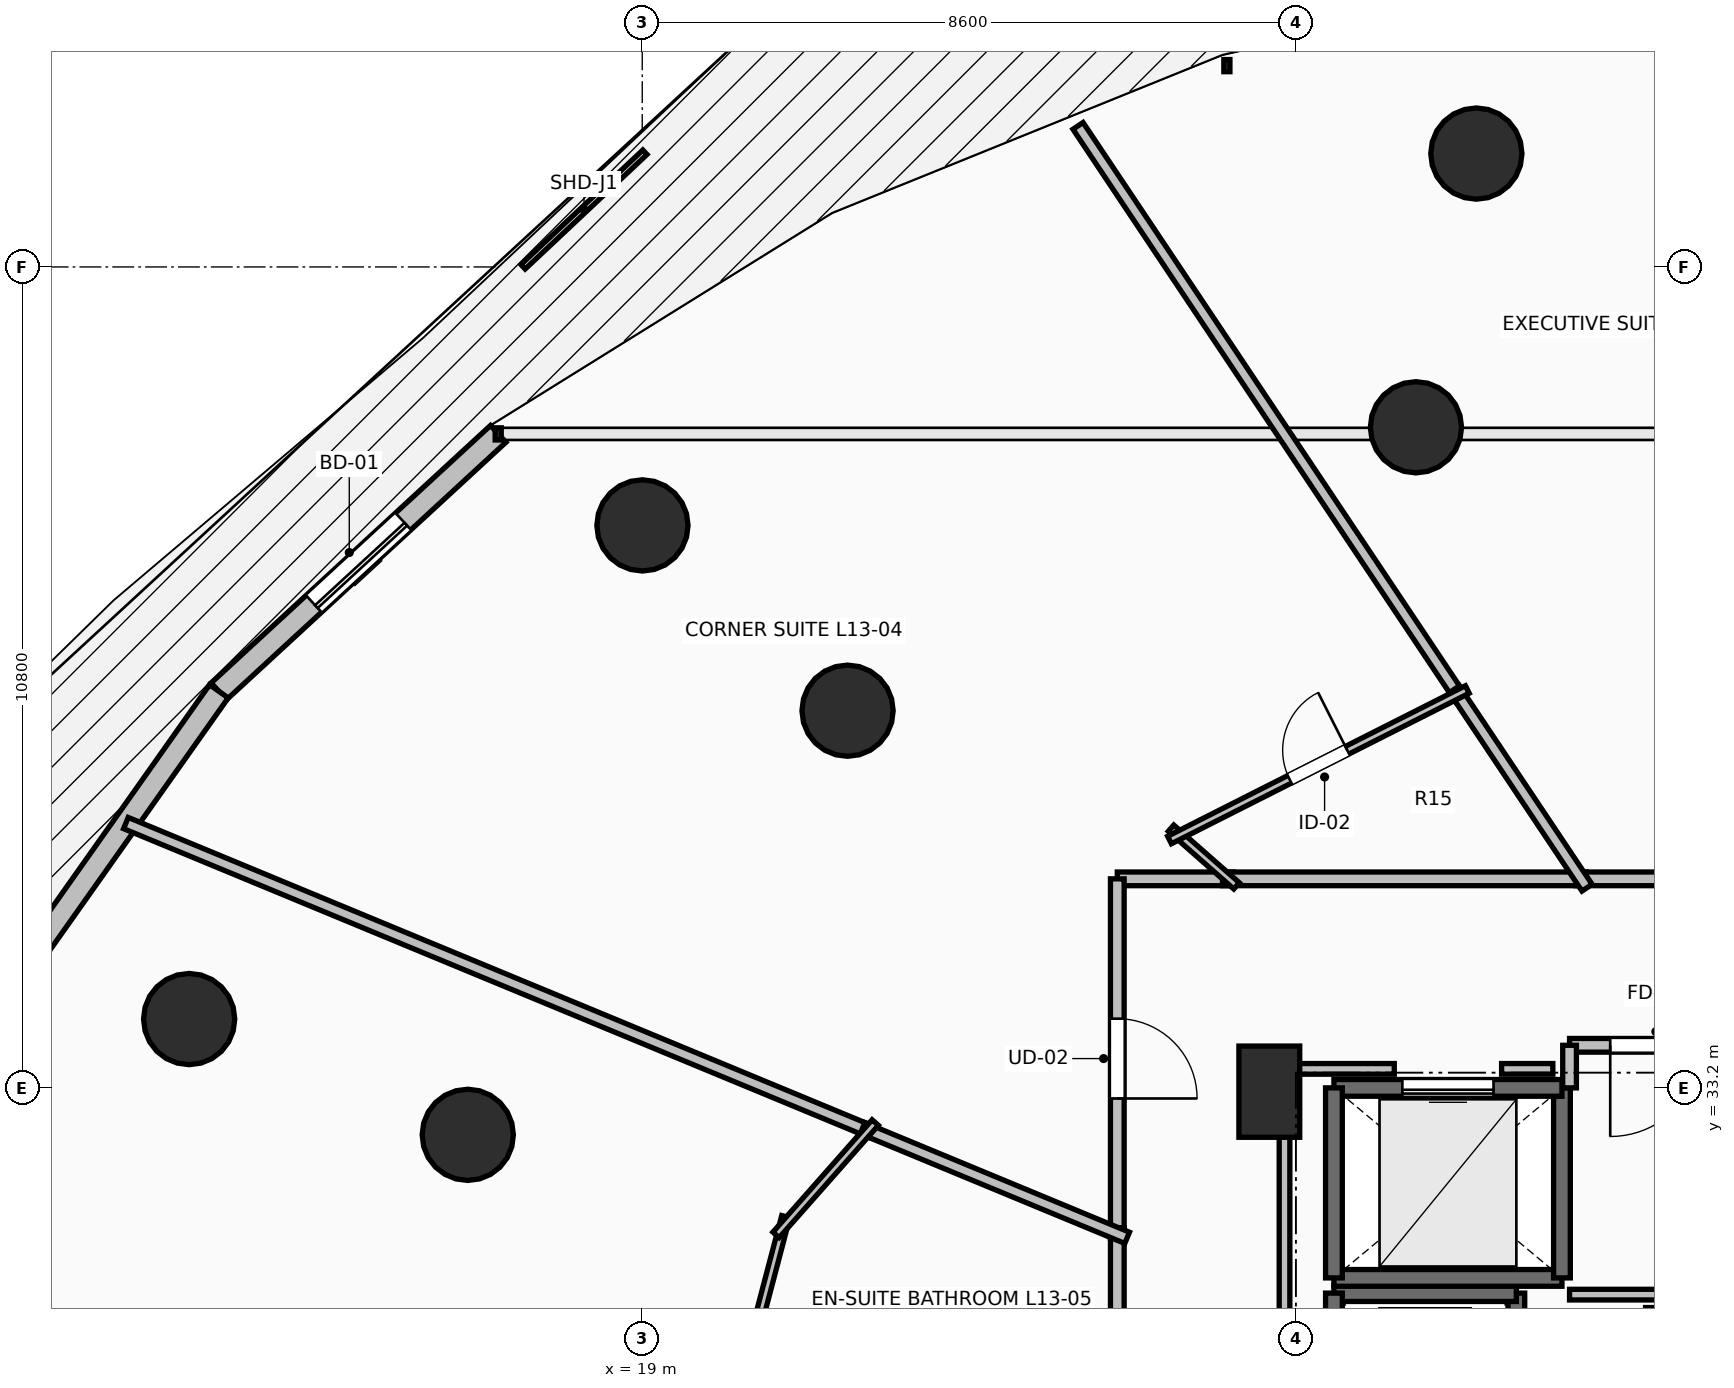
"""IFC4 building model, lengths in metres.
Left out: names, types, materials, properties, quantities, classifications, styles, units other than length and angle.
Written with IfcOpenShell. Run it as: python <this file> out.ifc"""

import sys

from ifc_helpers import new_model, si_unit, direction, frame, frame_2d, origin, origin_2d, place, context, subcontext, project, spatial, rectangle, circle, extrude, element, fill, save


model = new_model("IFC4")
c1 = context("Model", 3, precision=1e-05, world=origin(), true_north=direction((0.0, 1.0)))
c2 = subcontext(c1, "Body", "Model", "MODEL_VIEW")
j1 = project(units=[si_unit("LENGTHUNIT", "METRE"), si_unit("PLANEANGLEUNIT", "RADIAN")], contexts=[c1])
p1 = place(None, origin())
s1 = spatial("IfcSite", under=j1, at=p1, CompositionType="ELEMENT")
p2 = place(p1, origin())
s2 = spatial("IfcBuilding", under=s1, at=p2, CompositionType="ELEMENT")
p3 = place(p2, frame((0.0, 0.0, 52.0)))
s3 = spatial("IfcBuildingStorey", under=s2, at=p3, CompositionType="ELEMENT", Elevation=52.0)
for number, where, z_axis, x_axis in (
    (1, (29.179, 41.891, 0.0), (0.0, 0.0, 1.0), (-0.383, 0.924, 0.0)),
    (2, (21.701, 38.162, 0.0), (0.0, 0.0, 1.0), (-0.707, 0.707, 0.0)),
    (3, (16.705, 32.582, 0.0), (0.0, 0.0, 1.0), (-0.924, 0.383, 0.0)),
    (4, (29.974, 45.492, 0.0), (0.0, 0.0, 1.0), (-0.383, 0.924, 0.0)),
    (5, (19.003, 40.6, 0.0), (0.0, 0.0, 1.0), (-0.707, 0.707, 0.0)),
    (6, (13.039, 34.105, 0.0), (0.0, 0.0, 1.0), (-0.924, 0.383, 0.0)),
):
    element("IfcColumn", number, at=place(p3, frame(where, z_axis=z_axis, x_axis=x_axis)), inside=s3, PredefinedType="COLUMN", context=c2, shape_type="SweptSolid", body=[
        extrude(circle(Radius=0.6, at=origin_2d()), origin(), (0.0, 0.0, 1.0), 3.5),
    ])
p4 = place(p3, frame((27.25, 33.15, 0.0), z_axis=(0.0, 0.0, 1.0), x_axis=(1.0, 0.0, 0.0)))
e7 = element("IfcColumn", 7, at=p4, inside=s3, PredefinedType="PILASTER", context=c2, shape_type="SweptSolid", body=[
    extrude(rectangle(XDim=0.8, YDim=1.2, at=origin_2d()), origin(), (0.0, 0.0, 1.0), 3.5),
])
p5 = place(p3, frame((17.105, 41.804, 0.0), z_axis=(0.0, 0.0, 1.0), x_axis=(-0.735342629635, -0.677695519419, 0.0)))
e8 = element("IfcWall", 8, at=p5, inside=s3, PredefinedType="STANDARD", context=c2, shape_type="SweptSolid", body=[
    extrude(rectangle(XDim=4.997, YDim=0.3, at=frame_2d((2.499, 0.0))), origin(), (0.0, 0.0, 1.0), 3.24),
])
p6 = place(p5, frame((1.699, 0.0, 0.0)))
e9 = element("IfcOpeningElement", 9, at=p6, cuts=e8, PredefinedType="OPENING", context=c2, shape_type="SweptSolid", body=[
    extrude(rectangle(XDim=1.6, YDim=2.3, at=frame_2d((0.8, 1.15))), frame((0.0, 0.165, 0.0), z_axis=(0.0, -1.0, 0.0), x_axis=(1.0, 0.0, 0.0)), (0.0, 0.0, 1.0), 0.33),
])
p7 = place(p3, frame((13.43, 38.417, 0.0), z_axis=(0.0, 0.0, 1.0), x_axis=(-0.577130815624, -0.816651713803, 0.0)))
e10 = element("IfcWall", 10, at=p7, inside=s3, PredefinedType="STANDARD", context=c2, shape_type="SweptSolid", body=[
    extrude(rectangle(XDim=4.731, YDim=0.3, at=frame_2d((2.366, 0.0))), origin(), (0.0, 0.0, 1.0), 3.24),
])
p8 = place(p3, frame((30.5, 28.0, 0.0), z_axis=(0.0, 0.0, 1.0), x_axis=(0.0, 1.0, 0.0)))
e11 = element("IfcWall", 11, at=p8, inside=s3, PredefinedType="SHEAR", context=c2, shape_type="SweptSolid", body=[
    extrude(rectangle(XDim=2.5, YDim=0.22, at=frame_2d((1.25, 0.0))), origin(), (0.0, 0.0, 1.0), 3.24),
])
p9 = place(p3, frame((30.5, 30.5, 0.0), z_axis=(0.0, 0.0, 1.0), x_axis=(-1.0, 0.0, 0.0)))
e12 = element("IfcWall", 12, at=p9, inside=s3, PredefinedType="SHEAR", context=c2, shape_type="SweptSolid", body=[
    extrude(rectangle(XDim=2.4, YDim=0.22, at=frame_2d((1.2, 0.0))), origin(), (0.0, 0.0, 1.0), 3.24),
])
p10 = place(p3, frame((28.1, 30.5, 0.0), z_axis=(0.0, 0.0, 1.0), x_axis=(0.0, -1.0, 0.0)))
e13 = element("IfcWall", 13, at=p10, inside=s3, PredefinedType="SHEAR", context=c2, shape_type="SweptSolid", body=[
    extrude(rectangle(XDim=2.5, YDim=0.22, at=frame_2d((1.25, 0.0))), origin(), (0.0, 0.0, 1.0), 3.24),
])
p11 = place(p3, frame((28.1, 30.7, 0.0), z_axis=(0.0, 0.0, 1.0), x_axis=(1.0, 0.0, 0.0)))
e14 = element("IfcWall", 14, at=p11, inside=s3, PredefinedType="SOLIDWALL", context=c2, shape_type="SweptSolid", body=[
    extrude(rectangle(XDim=3.0, YDim=0.22, at=frame_2d((1.5, 0.0))), origin(), (0.0, 0.0, 1.0), 3.24),
])
p12 = place(p3, frame((31.1, 30.7, 0.0), z_axis=(0.0, 0.0, 1.0), x_axis=(0.0, 1.0, 0.0)))
e15 = element("IfcWall", 15, at=p12, inside=s3, PredefinedType="SOLIDWALL", context=c2, shape_type="SweptSolid", body=[
    extrude(rectangle(XDim=2.5, YDim=0.22, at=frame_2d((1.25, 0.0))), origin(), (0.0, 0.0, 1.0), 3.24),
])
p13 = place(p3, frame((31.1, 33.2, 0.0), z_axis=(0.0, 0.0, 1.0), x_axis=(-1.0, 0.0, 0.0)))
e16 = element("IfcWall", 16, at=p13, inside=s3, PredefinedType="SOLIDWALL", context=c2, shape_type="SweptSolid", body=[
    extrude(rectangle(XDim=3.0, YDim=0.22, at=frame_2d((1.5, 0.0))), origin(), (0.0, 0.0, 1.0), 3.24),
])
p14 = place(p13, frame((0.9, 0.0, 0.0)))
e17 = element("IfcOpeningElement", 17, at=p14, cuts=e16, PredefinedType="OPENING", context=c2, shape_type="SweptSolid", body=[
    extrude(rectangle(XDim=1.2, YDim=2.2, at=frame_2d((0.6, 1.1))), frame((0.0, 0.125, 0.0), z_axis=(0.0, -1.0, 0.0), x_axis=(1.0, 0.0, 0.0)), (0.0, 0.0, 1.0), 0.25),
])
p15 = place(p3, frame((28.1, 33.2, 0.0), z_axis=(0.0, 0.0, 1.0), x_axis=(0.0, -1.0, 0.0)))
e18 = element("IfcWall", 18, at=p15, inside=s3, PredefinedType="SOLIDWALL", context=c2, shape_type="SweptSolid", body=[
    extrude(rectangle(XDim=2.5, YDim=0.22, at=frame_2d((1.25, 0.0))), origin(), (0.0, 0.0, 1.0), 3.24),
])
p16 = place(p3, frame((33.47, 33.76, 0.0), z_axis=(0.0, 0.0, 1.0), x_axis=(-1.0, 0.0, 0.0)))
e19 = element("IfcWall", 19, at=p16, inside=s3, PredefinedType="PARTITIONING", context=c2, shape_type="SweptSolid", body=[
    extrude(rectangle(XDim=2.27, YDim=0.18, at=frame_2d((1.135, 0.0))), origin(), (0.0, 0.0, 1.0), 3.24),
])
p17 = place(p16, frame((0.535, 0.0, 0.0)))
e20 = element("IfcOpeningElement", 20, at=p17, cuts=e19, PredefinedType="OPENING", context=c2, shape_type="SweptSolid", body=[
    extrude(rectangle(XDim=1.2, YDim=2.15, at=frame_2d((0.6, 1.075))), frame((0.0, 0.105, 0.0), z_axis=(0.0, -1.0, 0.0), x_axis=(1.0, 0.0, 0.0)), (0.0, 0.0, 1.0), 0.21),
])
p18 = place(p3, frame((31.2, 33.76, 0.0), z_axis=(0.0, 0.0, 1.0), x_axis=(0.0, -1.0, 0.0)))
e21 = element("IfcWall", 21, at=p18, inside=s3, PredefinedType="PARTITIONING", context=c2, shape_type="SweptSolid", body=[
    extrude(rectangle(XDim=0.56, YDim=0.18, at=frame_2d((0.28, 0.0))), origin(), (0.0, 0.0, 1.0), 3.24),
])
p19 = place(p3, frame((35.422, 35.95, 0.0), z_axis=(0.0, 0.0, 1.0), x_axis=(-1.0, 0.0, 0.0)))
e22 = element("IfcWall", 22, at=p19, inside=s3, PredefinedType="PARTITIONING", context=c2, shape_type="SweptSolid", body=[
    extrude(rectangle(XDim=4.142, YDim=0.18, at=frame_2d((2.071, 0.0))), origin(), (0.0, 0.0, 1.0), 3.24),
])
p20 = place(p19, frame((1.546, 0.0, 0.0)))
e23 = element("IfcOpeningElement", 23, at=p20, cuts=e22, PredefinedType="OPENING", context=c2, shape_type="SweptSolid", body=[
    extrude(rectangle(XDim=1.05, YDim=2.2, at=frame_2d((0.525, 1.1))), frame((0.0, 0.105, 0.0), z_axis=(0.0, -1.0, 0.0), x_axis=(1.0, 0.0, 0.0)), (0.0, 0.0, 1.0), 0.21),
])
p21 = place(p3, frame((26.774, 35.95, 0.0), z_axis=(0.0, 0.0, 1.0), x_axis=(-1.0, 0.0, 0.0)))
e24 = element("IfcWall", 24, at=p21, inside=s3, PredefinedType="PARTITIONING", context=c2, shape_type="SweptSolid", body=[
    extrude(rectangle(XDim=1.524, YDim=0.18, at=frame_2d((0.762, 0.0))), origin(), (0.0, 0.0, 1.0), 2.886),
])
p22 = place(p3, frame((25.25, 35.95, 0.0), z_axis=(0.0, 0.0, 1.0), x_axis=(0.0, -1.0, 0.0)))
e25 = element("IfcWall", 25, at=p22, inside=s3, PredefinedType="PARTITIONING", context=c2, shape_type="SweptSolid", body=[
    extrude(rectangle(XDim=4.729, YDim=0.18, at=frame_2d((2.365, 0.0))), origin(), (0.0, 0.0, 1.0), 2.432),
])
p23 = place(p22, frame((1.84, 0.0, 0.0)))
e26 = element("IfcOpeningElement", 26, at=p23, cuts=e25, PredefinedType="OPENING", context=c2, shape_type="SweptSolid", body=[
    extrude(rectangle(XDim=1.05, YDim=2.2, at=frame_2d((0.525, 1.1))), frame((0.0, 0.105, 0.0), z_axis=(0.0, -1.0, 0.0), x_axis=(1.0, 0.0, 0.0)), (0.0, 0.0, 1.0), 0.21),
])
p24 = place(p3, frame((31.42, 35.95, 0.0), z_axis=(0.0, 0.0, 1.0), x_axis=(-1.0, 0.0, 0.0)))
e27 = element("IfcWall", 27, at=p24, inside=s3, PredefinedType="PARTITIONING", context=c2, shape_type="SweptSolid", body=[
    extrude(rectangle(XDim=4.786, YDim=0.18, at=frame_2d((2.393, 0.0))), origin(), (0.0, 0.0, 1.0), 2.432),
])
p25 = place(p3, frame((25.25, 31.361, 0.0), z_axis=(0.0, 0.0, 1.0), x_axis=(0.0, -1.0, 0.0)))
e28 = element("IfcWall", 28, at=p25, inside=s3, PredefinedType="PARTITIONING", context=c2, shape_type="SweptSolid", body=[
    extrude(rectangle(XDim=3.727, YDim=0.18, at=frame_2d((1.864, 0.0))), origin(), (0.0, 0.0, 1.0), 2.432),
])
p26 = place(p3, frame((24.733, 45.856, 0.0), z_axis=(0.0, 0.0, 1.0), x_axis=(0.555564858458, -0.831473203444, 0.0)))
e29 = element("IfcWall", 29, at=p26, inside=s3, PredefinedType="PARTITIONING", context=c2, shape_type="SweptSolid", body=[
    extrude(rectangle(XDim=9.054, YDim=0.16, at=frame_2d((4.527, 0.0))), origin(), (0.0, 0.0, 1.0), 2.432),
])
p27 = place(p3, frame((29.685, 38.444, 0.0), z_axis=(0.0, 0.0, 1.0), x_axis=(0.555596981897, -0.831451738652, 0.0)))
e30 = element("IfcWall", 30, at=p27, inside=s3, PredefinedType="PARTITIONING", context=c2, shape_type="SweptSolid", body=[
    extrude(rectangle(XDim=3.14, YDim=0.16, at=frame_2d((1.57, 0.0))), origin(), (0.0, 0.0, 1.0), 2.432),
])
p28 = place(p3, frame((26.819, 35.857, 0.0), z_axis=(0.0, 0.0, 1.0), x_axis=(-0.750624975639, 0.660728496394, 0.0)))
e31 = element("IfcWall", 31, at=p28, inside=s3, PredefinedType="PARTITIONING", context=c2, shape_type="SweptSolid", body=[
    extrude(rectangle(XDim=1.149, YDim=0.11, at=frame_2d((0.574, 0.0))), origin(), (0.0, 0.0, 1.0), 2.886),
])
p29 = place(p3, frame((25.937, 36.461, 0.0), z_axis=(0.0, 0.0, 1.0), x_axis=(0.892461080662, 0.451124394711, 0.0)))
e32 = element("IfcWall", 32, at=p29, inside=s3, PredefinedType="PARTITIONING", context=c2, shape_type="SweptSolid", body=[
    extrude(rectangle(XDim=4.39, YDim=0.11, at=frame_2d((2.195, 0.0))), origin(), (0.0, 0.0, 1.0), 2.432),
])
p30 = place(p29, frame((1.77, 0.0, 0.0)))
e33 = element("IfcOpeningElement", 33, at=p30, cuts=e32, PredefinedType="OPENING", context=c2, shape_type="SweptSolid", body=[
    extrude(rectangle(XDim=0.85, YDim=2.1, at=frame_2d((0.425, 1.05))), frame((0.0, 0.07, 0.0), z_axis=(0.0, -1.0, 0.0), x_axis=(1.0, 0.0, 0.0)), (0.0, 0.0, 1.0), 0.14),
])
p31 = place(p3, frame((12.207, 36.684, 0.0), z_axis=(0.0, 0.0, 1.0), x_axis=(0.923876032578, -0.382691881842, 0.0)))
e34 = element("IfcWall", 34, at=p31, inside=s3, PredefinedType="PARTITIONING", context=c2, shape_type="SweptSolid", body=[
    extrude(rectangle(XDim=10.63, YDim=0.16, at=frame_2d((5.315, 0.0))), origin(), (0.0, 0.0, 1.0), 2.624),
])
p32 = place(p3, frame((21.899, 32.669, 0.0), z_axis=(0.0, 0.0, 1.0), x_axis=(0.923843852071, -0.382769561211, 0.0)))
e35 = element("IfcWall", 35, at=p32, inside=s3, PredefinedType="PARTITIONING", context=c2, shape_type="SweptSolid", body=[
    extrude(rectangle(XDim=3.768, YDim=0.16, at=frame_2d((1.884, 0.0))), origin(), (0.0, 0.0, 1.0), 2.886),
])
p33 = place(p3, frame((20.037, 28.273, 0.0), z_axis=(0.0, 0.0, 1.0), x_axis=(0.254593926267, 0.967048050878, 0.0)))
e36 = element("IfcWall", 36, at=p33, inside=s3, PredefinedType="PARTITIONING", context=c2, shape_type="SweptSolid", body=[
    extrude(rectangle(XDim=3.344, YDim=0.11, at=frame_2d((1.672, 0.0))), origin(), (0.0, 0.0, 1.0), 2.432),
])
p34 = place(p3, frame((20.76, 31.266, 0.0), z_axis=(0.0, 0.0, 1.0), x_axis=(0.662047420969, 0.749461948593, 0.0)))
e37 = element("IfcWall", 37, at=p34, inside=s3, PredefinedType="PARTITIONING", context=c2, shape_type="SweptSolid", body=[
    extrude(rectangle(XDim=1.972, YDim=0.11, at=frame_2d((0.986, 0.0))), origin(), (0.0, 0.0, 1.0), 3.24),
])
p35 = place(p3, frame((31.2, 30.48, 0.0), z_axis=(0.0, 0.0, 1.0), x_axis=(1.0, 0.0, 0.0)))
e38 = element("IfcWall", 38, at=p35, inside=s3, PredefinedType="PARTITIONING", context=c2, shape_type="SweptSolid", body=[
    extrude(rectangle(XDim=2.05, YDim=0.14, at=frame_2d((1.025, 0.0))), origin(), (0.0, 0.0, 1.0), 3.24),
])
p36 = place(p3, frame((27.45, 28.196, 0.0), z_axis=(0.0, 0.0, 1.0), x_axis=(0.0, 1.0, 0.0)))
e39 = element("IfcWall", 39, at=p36, inside=s3, PredefinedType="PARTITIONING", context=c2, shape_type="SweptSolid", body=[
    extrude(rectangle(XDim=5.254, YDim=0.14, at=frame_2d((2.627, 0.0))), origin(), (0.0, 0.0, 1.0), 2.432),
])
p37 = place(p3, frame((27.45, 33.45, 0.0), z_axis=(0.0, 0.0, 1.0), x_axis=(1.0, 0.0, 0.0)))
e40 = element("IfcWall", 40, at=p37, inside=s3, PredefinedType="PARTITIONING", context=c2, shape_type="SweptSolid", body=[
    extrude(rectangle(XDim=1.444, YDim=0.14, at=frame_2d((0.722, 0.0))), origin(), (0.0, 0.0, 1.0), 2.432),
])
p38 = place(p3, frame((30.306, 33.45, 0.0), z_axis=(0.0, 0.0, 1.0), x_axis=(1.0, 0.0, 0.0)))
e41 = element("IfcWall", 41, at=p38, inside=s3, PredefinedType="PARTITIONING", context=c2, shape_type="SweptSolid", body=[
    extrude(rectangle(XDim=0.674, YDim=0.14, at=frame_2d((0.337, 0.0))), origin(), (0.0, 0.0, 1.0), 3.24),
])
p39 = place(p6, origin())
e42 = element("IfcDoor", 42, at=p39, inside=s3, OperationType="SLIDING_TO_LEFT", PredefinedType="DOOR", context=c2, shape_type="SweptSolid", body=[
    extrude(rectangle(XDim=1.6, YDim=2.3, at=frame_2d((0.8, 1.15))), frame((0.0, 0.025, 0.0), z_axis=(0.0, -1.0, 0.0), x_axis=(1.0, 0.0, 0.0)), (0.0, 0.0, 1.0), 0.05),
])
fill(e9, e42)
p40 = place(p14, origin())
e43 = element("IfcDoor", 43, at=p40, inside=s3, OperationType="SLIDING_TO_LEFT", PredefinedType="DOOR", context=c2, shape_type="SweptSolid", body=[
    extrude(rectangle(XDim=1.2, YDim=2.2, at=frame_2d((0.6, 1.1))), frame((0.0, 0.025, 0.0), z_axis=(0.0, -1.0, 0.0), x_axis=(1.0, 0.0, 0.0)), (0.0, 0.0, 1.0), 0.05),
])
fill(e17, e43)
p41 = place(p17, origin())
e44 = element("IfcDoor", 44, at=p41, inside=s3, OperationType="SINGLE_SWING_RIGHT", PredefinedType="DOOR", context=c2, shape_type="SweptSolid", body=[
    extrude(rectangle(XDim=1.2, YDim=2.15, at=frame_2d((0.6, 1.075))), frame((0.0, 0.025, 0.0), z_axis=(0.0, -1.0, 0.0), x_axis=(1.0, 0.0, 0.0)), (0.0, 0.0, 1.0), 0.05),
])
fill(e20, e44)
p42 = place(p23, origin())
e45 = element("IfcDoor", 45, at=p42, inside=s3, OperationType="SINGLE_SWING_RIGHT", PredefinedType="DOOR", context=c2, shape_type="SweptSolid", body=[
    extrude(rectangle(XDim=1.05, YDim=2.2, at=frame_2d((0.525, 1.1))), frame((0.0, 0.025, 0.0), z_axis=(0.0, -1.0, 0.0), x_axis=(1.0, 0.0, 0.0)), (0.0, 0.0, 1.0), 0.05),
])
fill(e26, e45)
p43 = place(p30, origin())
e46 = element("IfcDoor", 46, at=p43, inside=s3, OperationType="SINGLE_SWING_RIGHT", PredefinedType="DOOR", context=c2, shape_type="SweptSolid", body=[
    extrude(rectangle(XDim=0.85, YDim=2.1, at=frame_2d((0.425, 1.05))), frame((0.0, 0.025, 0.0), z_axis=(0.0, -1.0, 0.0), x_axis=(1.0, 0.0, 0.0)), (0.0, 0.0, 1.0), 0.05),
])
fill(e33, e46)
save(model, sys.argv[1])
